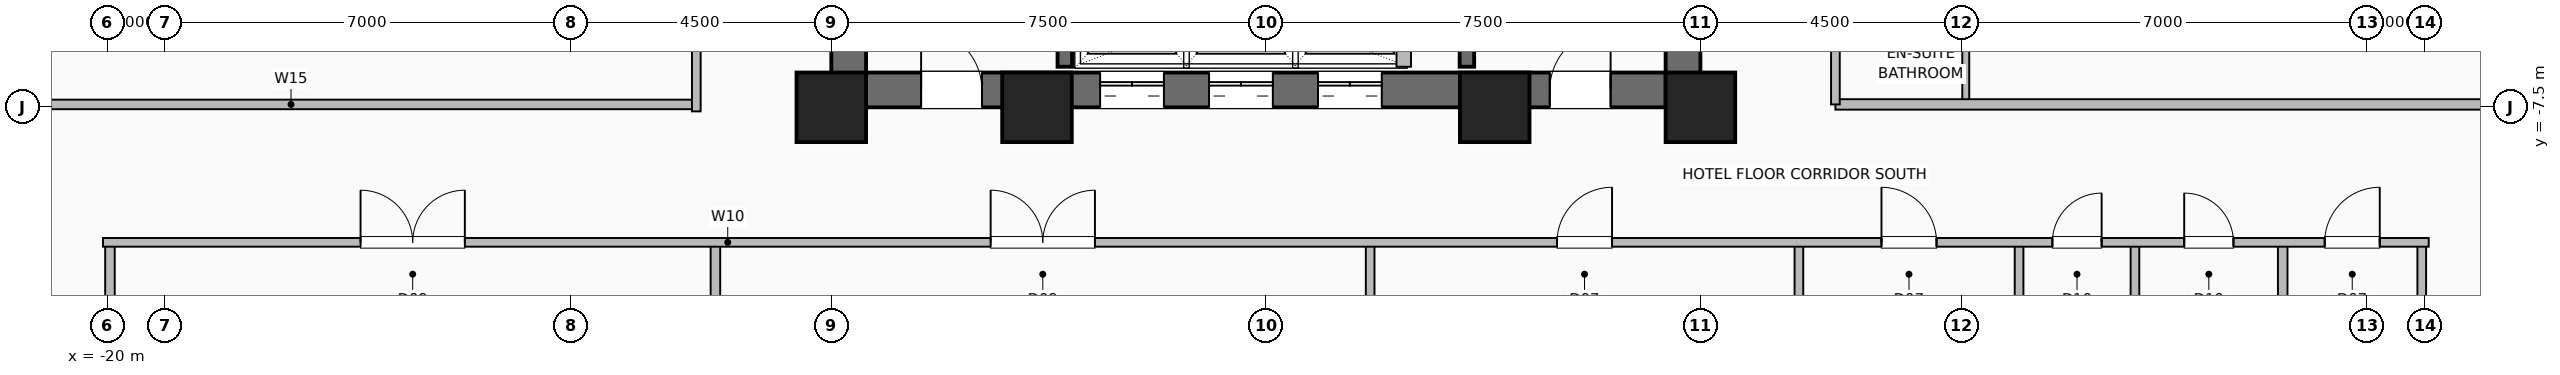
"""IFC4 building model, lengths in metres.
Left out: names, types, materials, properties, quantities, classifications, styles, units other than length and angle.
Written with IfcOpenShell. Run it as: python <this file> out.ifc"""

import sys

from ifc_helpers import new_model, si_unit, direction, frame, frame_2d, origin, origin_2d, place, context, subcontext, project, spatial, rectangle, hollow_rectangle, extrude, element, fill, save


model = new_model("IFC4")
c1 = context("Model", 3, precision=1e-05, world=origin(), true_north=direction((0.0, 1.0)))
c2 = subcontext(c1, "Body", "Model", "MODEL_VIEW")
j1 = project(units=[si_unit("LENGTHUNIT", "METRE"), si_unit("PLANEANGLEUNIT", "RADIAN")], contexts=[c1])
p1 = place(None, origin())
s1 = spatial("IfcSite", under=j1, at=p1, CompositionType="ELEMENT")
p2 = place(p1, origin())
s2 = spatial("IfcBuilding", under=s1, at=p2, CompositionType="ELEMENT")
p3 = place(p2, frame((0.0, 0.0, 72.5)))
s3 = spatial("IfcBuildingStorey", under=s2, at=p3, CompositionType="ELEMENT", Elevation=72.5)
for number, where, z_axis, x_axis in (
    (1, (-7.5, -7.5, 0.0), (0.0, 0.0, 1.0), (1.0, 0.0, 0.0)),
    (2, (-3.95, -7.5, 0.0), (0.0, 0.0, 1.0), (1.0, 0.0, 0.0)),
    (3, (3.95, -7.5, 0.0), (0.0, 0.0, 1.0), (1.0, 0.0, 0.0)),
    (4, (7.5, -7.5, 0.0), (0.0, 0.0, 1.0), (1.0, 0.0, 0.0)),
):
    element("IfcColumn", number, at=place(p3, frame(where, z_axis=z_axis, x_axis=x_axis)), inside=s3, PredefinedType="COLUMN", context=c2, shape_type="SweptSolid", body=[
        extrude(hollow_rectangle(XDim=1.2, YDim=1.2, WallThickness=0.055, at=origin_2d()), origin(), (0.0, 0.0, 1.0), 3.5),
    ])
p4 = place(p3, frame((-7.5, -7.2, 0.0), z_axis=(0.0, 0.0, 1.0), x_axis=(1.0, 0.0, 0.0)))
e5 = element("IfcWall", 5, at=p4, inside=s3, PredefinedType="SHEAR", context=c2, shape_type="SweptSolid", body=[
    extrude(rectangle(XDim=15.0, YDim=0.6, at=frame_2d((7.5, 0.0))), origin(), (0.0, 0.0, 1.0), 3.25),
])
p5 = place(p4, frame((1.55, 0.0, 0.0)))
e6 = element("IfcOpeningElement", 6, at=p5, cuts=e5, PredefinedType="OPENING", context=c2, shape_type="SweptSolid", body=[
    extrude(rectangle(XDim=1.05, YDim=2.08, at=frame_2d((0.525, 1.04))), frame((0.0, 0.31, 0.0), z_axis=(0.0, -1.0, 0.0), x_axis=(1.0, 0.0, 0.0)), (0.0, 0.0, 1.0), 0.62),
])
p6 = place(p4, frame((12.4, 0.0, 0.0)))
e7 = element("IfcOpeningElement", 7, at=p6, cuts=e5, PredefinedType="OPENING", context=c2, shape_type="SweptSolid", body=[
    extrude(rectangle(XDim=1.05, YDim=2.08, at=frame_2d((0.525, 1.04))), frame((0.0, 0.31, 0.0), z_axis=(0.0, -1.0, 0.0), x_axis=(1.0, 0.0, 0.0)), (0.0, 0.0, 1.0), 0.62),
])
p7 = place(p4, frame((4.64, 0.0, 0.0)))
e8 = element("IfcOpeningElement", 8, at=p7, cuts=e5, PredefinedType="OPENING", context=c2, shape_type="SweptSolid", body=[
    extrude(rectangle(XDim=1.1, YDim=2.2, at=frame_2d((0.55, 1.1))), frame((0.0, 0.31, 0.0), z_axis=(0.0, -1.0, 0.0), x_axis=(1.0, 0.0, 0.0)), (0.0, 0.0, 1.0), 0.62),
])
p8 = place(p4, frame((6.52, 0.0, 0.0)))
e9 = element("IfcOpeningElement", 9, at=p8, cuts=e5, PredefinedType="OPENING", context=c2, shape_type="SweptSolid", body=[
    extrude(rectangle(XDim=1.1, YDim=2.2, at=frame_2d((0.55, 1.1))), frame((0.0, 0.31, 0.0), z_axis=(0.0, -1.0, 0.0), x_axis=(1.0, 0.0, 0.0)), (0.0, 0.0, 1.0), 0.62),
])
p9 = place(p4, frame((8.4, 0.0, 0.0)))
e10 = element("IfcOpeningElement", 10, at=p9, cuts=e5, PredefinedType="OPENING", context=c2, shape_type="SweptSolid", body=[
    extrude(rectangle(XDim=1.1, YDim=2.2, at=frame_2d((0.55, 1.1))), frame((0.0, 0.31, 0.0), z_axis=(0.0, -1.0, 0.0), x_axis=(1.0, 0.0, 0.0)), (0.0, 0.0, 1.0), 0.62),
])
p10 = place(p3, frame((-7.2, -7.5, 0.0), z_axis=(0.0, 0.0, 1.0), x_axis=(0.0, 1.0, 0.0)))
e11 = element("IfcWall", 11, at=p10, inside=s3, PredefinedType="SHEAR", context=c2, shape_type="SweptSolid", body=[
    extrude(rectangle(XDim=15.0, YDim=0.6, at=frame_2d((7.5, 0.0))), origin(), (0.0, 0.0, 1.0), 3.25),
])
p11 = place(p10, frame((9.5, 0.0, 0.0)))
e12 = element("IfcOpeningElement", 12, at=p11, cuts=e11, PredefinedType="OPENING", context=c2, shape_type="SweptSolid", body=[
    extrude(rectangle(XDim=1.0, YDim=2.08, at=frame_2d((0.5, 1.04))), frame((0.0, 0.31, 0.0), z_axis=(0.0, -1.0, 0.0), x_axis=(1.0, 0.0, 0.0)), (0.0, 0.0, 1.0), 0.62),
])
p12 = place(p3, frame((7.2, -7.5, 0.0), z_axis=(0.0, 0.0, 1.0), x_axis=(0.0, 1.0, 0.0)))
e13 = element("IfcWall", 13, at=p12, inside=s3, PredefinedType="SHEAR", context=c2, shape_type="SweptSolid", body=[
    extrude(rectangle(XDim=15.0, YDim=0.6, at=frame_2d((7.5, 0.0))), origin(), (0.0, 0.0, 1.0), 3.25),
])
for number, where, z_axis, x_axis in (
    (14, (-3.47, -6.8, 0.0), (0.0, 0.0, 1.0), (0.0, 1.0, 0.0)),
    (15, (3.47, -6.8, 0.0), (0.0, 0.0, 1.0), (0.0, 1.0, 0.0)),
):
    element("IfcWall", number, at=place(p3, frame(where, z_axis=z_axis, x_axis=x_axis)), inside=s3, PredefinedType="SHEAR", context=c2, shape_type="SweptSolid", body=[
        extrude(rectangle(XDim=7.72, YDim=0.25, at=frame_2d((3.86, 0.0))), origin(), (0.0, 0.0, 1.0), 3.25),
    ])
p13 = place(p3, frame((2.38, -6.8, 0.0), z_axis=(0.0, 0.0, 1.0), x_axis=(0.0, 1.0, 0.0)))
e16 = element("IfcWall", 16, at=p13, inside=s3, PredefinedType="SHEAR", context=c2, shape_type="SweptSolid", body=[
    extrude(rectangle(XDim=2.22, YDim=0.25, at=frame_2d((1.11, 0.0))), origin(), (0.0, 0.0, 1.0), 3.25),
])
for number, where, z_axis, x_axis in (
    (17, (17.55, -23.82, 0.0), (0.0, 0.0, 1.0), (0.0, 1.0, 0.0)),
    (18, (-19.95, -23.82, 0.0), (0.0, 0.0, 1.0), (0.0, 1.0, 0.0)),
    (19, (-9.5, -23.82, 0.0), (0.0, 0.0, 1.0), (0.0, 1.0, 0.0)),
):
    element("IfcWall", number, at=place(p3, frame(where, z_axis=z_axis, x_axis=x_axis)), inside=s3, PredefinedType="PLUMBINGWALL", context=c2, shape_type="SweptSolid", body=[
        extrude(rectangle(XDim=13.99, YDim=0.165, at=frame_2d((6.995, 0.0))), origin(), (0.0, 0.0, 1.0), 3.25),
    ])
for number, where, z_axis, x_axis in (
    (20, (1.8, -23.82, 0.0), (0.0, 0.0, 1.0), (0.0, 1.0, 0.0)),
    (21, (9.2, -23.82, 0.0), (0.0, 0.0, 1.0), (0.0, 1.0, 0.0)),
    (22, (13.0, -23.82, 0.0), (0.0, 0.0, 1.0), (0.0, 1.0, 0.0)),
    (23, (15.0, -23.82, 0.0), (0.0, 0.0, 1.0), (0.0, 1.0, 0.0)),
    (24, (19.95, -23.82, 0.0), (0.0, 0.0, 1.0), (0.0, 1.0, 0.0)),
):
    element("IfcWall", number, at=place(p3, frame(where, z_axis=z_axis, x_axis=x_axis)), inside=s3, PredefinedType="PARTITIONING", context=c2, shape_type="SweptSolid", body=[
        extrude(rectangle(XDim=13.99, YDim=0.15, at=frame_2d((6.995, 0.0))), origin(), (0.0, 0.0, 1.0), 3.25),
    ])
p14 = place(p3, frame((-20.07, -9.83, 0.0), z_axis=(0.0, 0.0, 1.0), x_axis=(1.0, 0.0, 0.0)))
e25 = element("IfcWall", 25, at=p14, inside=s3, PredefinedType="PARTITIONING", context=c2, shape_type="SweptSolid", body=[
    extrude(rectangle(XDim=40.14, YDim=0.15, at=frame_2d((20.07, 0.0))), origin(), (0.0, 0.0, 1.0), 3.25),
])
p15 = place(p14, frame((4.445, 0.0, 0.0)))
e26 = element("IfcOpeningElement", 26, at=p15, cuts=e25, PredefinedType="OPENING", context=c2, shape_type="SweptSolid", body=[
    extrude(rectangle(XDim=1.8, YDim=2.08, at=frame_2d((0.9, 1.04))), frame((0.0, 0.085, 0.0), z_axis=(0.0, -1.0, 0.0), x_axis=(1.0, 0.0, 0.0)), (0.0, 0.0, 1.0), 0.17),
])
p16 = place(p14, frame((15.32, 0.0, 0.0)))
e27 = element("IfcOpeningElement", 27, at=p16, cuts=e25, PredefinedType="OPENING", context=c2, shape_type="SweptSolid", body=[
    extrude(rectangle(XDim=1.8, YDim=2.08, at=frame_2d((0.9, 1.04))), frame((0.0, 0.085, 0.0), z_axis=(0.0, -1.0, 0.0), x_axis=(1.0, 0.0, 0.0)), (0.0, 0.0, 1.0), 0.17),
])
p17 = place(p14, frame((25.095, 0.0, 0.0)))
e28 = element("IfcOpeningElement", 28, at=p17, cuts=e25, PredefinedType="OPENING", context=c2, shape_type="SweptSolid", body=[
    extrude(rectangle(XDim=0.95, YDim=2.06, at=frame_2d((0.475, 1.03))), frame((0.0, 0.085, 0.0), z_axis=(0.0, -1.0, 0.0), x_axis=(1.0, 0.0, 0.0)), (0.0, 0.0, 1.0), 0.17),
])
p18 = place(p14, frame((30.695, 0.0, 0.0)))
e29 = element("IfcOpeningElement", 29, at=p18, cuts=e25, PredefinedType="OPENING", context=c2, shape_type="SweptSolid", body=[
    extrude(rectangle(XDim=0.95, YDim=2.06, at=frame_2d((0.475, 1.03))), frame((0.0, 0.085, 0.0), z_axis=(0.0, -1.0, 0.0), x_axis=(1.0, 0.0, 0.0)), (0.0, 0.0, 1.0), 0.17),
])
p19 = place(p14, frame((33.645, 0.0, 0.0)))
e30 = element("IfcOpeningElement", 30, at=p19, cuts=e25, PredefinedType="OPENING", context=c2, shape_type="SweptSolid", body=[
    extrude(rectangle(XDim=0.85, YDim=2.05, at=frame_2d((0.425, 1.025))), frame((0.0, 0.085, 0.0), z_axis=(0.0, -1.0, 0.0), x_axis=(1.0, 0.0, 0.0)), (0.0, 0.0, 1.0), 0.17),
])
p20 = place(p14, frame((35.92, 0.0, 0.0)))
e31 = element("IfcOpeningElement", 31, at=p20, cuts=e25, PredefinedType="OPENING", context=c2, shape_type="SweptSolid", body=[
    extrude(rectangle(XDim=0.85, YDim=2.05, at=frame_2d((0.425, 1.025))), frame((0.0, 0.085, 0.0), z_axis=(0.0, -1.0, 0.0), x_axis=(1.0, 0.0, 0.0)), (0.0, 0.0, 1.0), 0.17),
])
p21 = place(p14, frame((38.345, 0.0, 0.0)))
e32 = element("IfcOpeningElement", 32, at=p21, cuts=e25, PredefinedType="OPENING", context=c2, shape_type="SweptSolid", body=[
    extrude(rectangle(XDim=0.95, YDim=2.06, at=frame_2d((0.475, 1.03))), frame((0.0, 0.085, 0.0), z_axis=(0.0, -1.0, 0.0), x_axis=(1.0, 0.0, 0.0)), (0.0, 0.0, 1.0), 0.17),
])
p22 = place(p3, frame((-23.82, -7.45, 0.0), z_axis=(0.0, 0.0, 1.0), x_axis=(1.0, 0.0, 0.0)))
e33 = element("IfcWall", 33, at=p22, inside=s3, PredefinedType="PLUMBINGWALL", context=c2, shape_type="SweptSolid", body=[
    extrude(rectangle(XDim=13.99, YDim=0.165, at=frame_2d((6.995, 0.0))), origin(), (0.0, 0.0, 1.0), 3.25),
])
p23 = place(p3, frame((-9.83, -7.57, 0.0), z_axis=(0.0, 0.0, 1.0), x_axis=(0.0, 1.0, 0.0)))
e34 = element("IfcWall", 34, at=p23, inside=s3, PredefinedType="PARTITIONING", context=c2, shape_type="SweptSolid", body=[
    extrude(rectangle(XDim=15.14, YDim=0.15, at=frame_2d((7.57, 0.0))), origin(), (0.0, 0.0, 1.0), 3.25),
])
p24 = place(p23, frame((2.47, 0.0, 0.0)))
e35 = element("IfcOpeningElement", 35, at=p24, cuts=e34, PredefinedType="OPENING", context=c2, shape_type="SweptSolid", body=[
    extrude(rectangle(XDim=0.95, YDim=2.06, at=frame_2d((0.475, 1.03))), frame((0.0, 0.085, 0.0), z_axis=(0.0, -1.0, 0.0), x_axis=(1.0, 0.0, 0.0)), (0.0, 0.0, 1.0), 0.17),
])
p25 = place(p23, frame((8.595, 0.0, 0.0)))
e36 = element("IfcOpeningElement", 36, at=p25, cuts=e34, PredefinedType="OPENING", context=c2, shape_type="SweptSolid", body=[
    extrude(rectangle(XDim=0.95, YDim=2.06, at=frame_2d((0.475, 1.03))), frame((0.0, 0.085, 0.0), z_axis=(0.0, -1.0, 0.0), x_axis=(1.0, 0.0, 0.0)), (0.0, 0.0, 1.0), 0.17),
])
p26 = place(p23, frame((13.27, 0.0, 0.0)))
e37 = element("IfcOpeningElement", 37, at=p26, cuts=e34, PredefinedType="OPENING", context=c2, shape_type="SweptSolid", body=[
    extrude(rectangle(XDim=0.85, YDim=2.05, at=frame_2d((0.425, 1.025))), frame((0.0, 0.085, 0.0), z_axis=(0.0, -1.0, 0.0), x_axis=(1.0, 0.0, 0.0)), (0.0, 0.0, 1.0), 0.17),
])
p27 = place(p3, frame((12.08, -7.42, 0.0), z_axis=(0.0, 0.0, 1.0), x_axis=(0.0, 1.0, 0.0)))
e38 = element("IfcWall", 38, at=p27, inside=s3, PredefinedType="PLUMBINGWALL", context=c2, shape_type="SweptSolid", body=[
    extrude(rectangle(XDim=2.008, YDim=0.12, at=frame_2d((1.004, 0.0))), origin(), (0.0, 0.0, 1.0), 3.25),
])
p28 = place(p3, frame((9.83, -7.45, 0.0), z_axis=(0.0, 0.0, 1.0), x_axis=(1.0, 0.0, 0.0)))
e39 = element("IfcWall", 39, at=p28, inside=s3, PredefinedType="PARTITIONING", context=c2, shape_type="SweptSolid", body=[
    extrude(rectangle(XDim=13.99, YDim=0.18, at=frame_2d((6.995, 0.0))), origin(), (0.0, 0.0, 1.0), 3.25),
])
p29 = place(p3, frame((9.83, -7.45, 0.0), z_axis=(0.0, 0.0, 1.0), x_axis=(0.0, 1.0, 0.0)))
e40 = element("IfcWall", 40, at=p29, inside=s3, PredefinedType="PARTITIONING", context=c2, shape_type="SweptSolid", body=[
    extrude(rectangle(XDim=14.9, YDim=0.15, at=frame_2d((7.45, 0.0))), origin(), (0.0, 0.0, 1.0), 3.25),
])
p30 = place(p29, frame((3.049, 0.0, 0.0)))
e41 = element("IfcOpeningElement", 41, at=p30, cuts=e40, PredefinedType="OPENING", context=c2, shape_type="SweptSolid", body=[
    extrude(rectangle(XDim=0.95, YDim=2.08, at=frame_2d((0.475, 1.04))), frame((0.0, 0.085, 0.0), z_axis=(0.0, -1.0, 0.0), x_axis=(1.0, 0.0, 0.0)), (0.0, 0.0, 1.0), 0.17),
])
p31 = place(p29, frame((7.927, 0.0, 0.0)))
e42 = element("IfcOpeningElement", 42, at=p31, cuts=e40, PredefinedType="OPENING", context=c2, shape_type="SweptSolid", body=[
    extrude(rectangle(XDim=0.95, YDim=2.08, at=frame_2d((0.475, 1.04))), frame((0.0, 0.085, 0.0), z_axis=(0.0, -1.0, 0.0), x_axis=(1.0, 0.0, 0.0)), (0.0, 0.0, 1.0), 0.17),
])
p32 = place(p29, frame((12.899, 0.0, 0.0)))
e43 = element("IfcOpeningElement", 43, at=p32, cuts=e40, PredefinedType="OPENING", context=c2, shape_type="SweptSolid", body=[
    extrude(rectangle(XDim=0.95, YDim=2.08, at=frame_2d((0.475, 1.04))), frame((0.0, 0.085, 0.0), z_axis=(0.0, -1.0, 0.0), x_axis=(1.0, 0.0, 0.0)), (0.0, 0.0, 1.0), 0.17),
])
p33 = place(p5, origin())
e44 = element("IfcDoor", 44, at=p33, inside=s3, OperationType="SINGLE_SWING_LEFT", PredefinedType="DOOR", context=c2, shape_type="SweptSolid", body=[
    extrude(rectangle(XDim=1.05, YDim=2.08, at=frame_2d((0.525, 1.04))), frame((0.0, 0.025, 0.0), z_axis=(0.0, -1.0, 0.0), x_axis=(1.0, 0.0, 0.0)), (0.0, 0.0, 1.0), 0.05),
])
fill(e6, e44)
p34 = place(p6, origin())
e45 = element("IfcDoor", 45, at=p34, inside=s3, OperationType="SINGLE_SWING_RIGHT", PredefinedType="DOOR", context=c2, shape_type="SweptSolid", body=[
    extrude(rectangle(XDim=1.05, YDim=2.08, at=frame_2d((0.525, 1.04))), frame((0.0, 0.025, 0.0), z_axis=(0.0, -1.0, 0.0), x_axis=(1.0, 0.0, 0.0)), (0.0, 0.0, 1.0), 0.05),
])
fill(e7, e45)
p35 = place(p7, origin())
e46 = element("IfcDoor", 46, at=p35, inside=s3, OperationType="DOUBLE_DOOR_SLIDING", PredefinedType="DOOR", context=c2, shape_type="SweptSolid", body=[
    extrude(rectangle(XDim=1.1, YDim=2.2, at=frame_2d((0.55, 1.1))), frame((0.0, 0.025, 0.0), z_axis=(0.0, -1.0, 0.0), x_axis=(1.0, 0.0, 0.0)), (0.0, 0.0, 1.0), 0.05),
])
fill(e8, e46)
p36 = place(p8, origin())
e47 = element("IfcDoor", 47, at=p36, inside=s3, OperationType="DOUBLE_DOOR_SLIDING", PredefinedType="DOOR", context=c2, shape_type="SweptSolid", body=[
    extrude(rectangle(XDim=1.1, YDim=2.2, at=frame_2d((0.55, 1.1))), frame((0.0, 0.025, 0.0), z_axis=(0.0, -1.0, 0.0), x_axis=(1.0, 0.0, 0.0)), (0.0, 0.0, 1.0), 0.05),
])
fill(e9, e47)
p37 = place(p9, origin())
e48 = element("IfcDoor", 48, at=p37, inside=s3, OperationType="DOUBLE_DOOR_SLIDING", PredefinedType="DOOR", context=c2, shape_type="SweptSolid", body=[
    extrude(rectangle(XDim=1.1, YDim=2.2, at=frame_2d((0.55, 1.1))), frame((0.0, 0.025, 0.0), z_axis=(0.0, -1.0, 0.0), x_axis=(1.0, 0.0, 0.0)), (0.0, 0.0, 1.0), 0.05),
])
fill(e10, e48)
p38 = place(p15, origin())
e49 = element("IfcDoor", 49, at=p38, inside=s3, OperationType="DOUBLE_DOOR_SINGLE_SWING", PredefinedType="DOOR", context=c2, shape_type="SweptSolid", body=[
    extrude(rectangle(XDim=1.8, YDim=2.08, at=frame_2d((0.9, 1.04))), frame((0.0, 0.025, 0.0), z_axis=(0.0, -1.0, 0.0), x_axis=(1.0, 0.0, 0.0)), (0.0, 0.0, 1.0), 0.05),
])
fill(e26, e49)
p39 = place(p16, origin())
e50 = element("IfcDoor", 50, at=p39, inside=s3, OperationType="DOUBLE_DOOR_SINGLE_SWING", PredefinedType="DOOR", context=c2, shape_type="SweptSolid", body=[
    extrude(rectangle(XDim=1.8, YDim=2.08, at=frame_2d((0.9, 1.04))), frame((0.0, 0.025, 0.0), z_axis=(0.0, -1.0, 0.0), x_axis=(1.0, 0.0, 0.0)), (0.0, 0.0, 1.0), 0.05),
])
fill(e27, e50)
p40 = place(p17, origin())
e51 = element("IfcDoor", 51, at=p40, inside=s3, OperationType="SINGLE_SWING_RIGHT", PredefinedType="DOOR", context=c2, shape_type="SweptSolid", body=[
    extrude(rectangle(XDim=0.95, YDim=2.06, at=frame_2d((0.475, 1.03))), frame((0.0, 0.025, 0.0), z_axis=(0.0, -1.0, 0.0), x_axis=(1.0, 0.0, 0.0)), (0.0, 0.0, 1.0), 0.05),
])
fill(e28, e51)
p41 = place(p18, origin())
e52 = element("IfcDoor", 52, at=p41, inside=s3, OperationType="SINGLE_SWING_LEFT", PredefinedType="DOOR", context=c2, shape_type="SweptSolid", body=[
    extrude(rectangle(XDim=0.95, YDim=2.06, at=frame_2d((0.475, 1.03))), frame((0.0, 0.025, 0.0), z_axis=(0.0, -1.0, 0.0), x_axis=(1.0, 0.0, 0.0)), (0.0, 0.0, 1.0), 0.05),
])
fill(e29, e52)
p42 = place(p19, origin())
e53 = element("IfcDoor", 53, at=p42, inside=s3, OperationType="SINGLE_SWING_RIGHT", PredefinedType="DOOR", context=c2, shape_type="SweptSolid", body=[
    extrude(rectangle(XDim=0.85, YDim=2.05, at=frame_2d((0.425, 1.025))), frame((0.0, 0.025, 0.0), z_axis=(0.0, -1.0, 0.0), x_axis=(1.0, 0.0, 0.0)), (0.0, 0.0, 1.0), 0.05),
])
fill(e30, e53)
p43 = place(p20, origin())
e54 = element("IfcDoor", 54, at=p43, inside=s3, OperationType="SINGLE_SWING_LEFT", PredefinedType="DOOR", context=c2, shape_type="SweptSolid", body=[
    extrude(rectangle(XDim=0.85, YDim=2.05, at=frame_2d((0.425, 1.025))), frame((0.0, 0.025, 0.0), z_axis=(0.0, -1.0, 0.0), x_axis=(1.0, 0.0, 0.0)), (0.0, 0.0, 1.0), 0.05),
])
fill(e31, e54)
p44 = place(p21, origin())
e55 = element("IfcDoor", 55, at=p44, inside=s3, OperationType="SINGLE_SWING_RIGHT", PredefinedType="DOOR", context=c2, shape_type="SweptSolid", body=[
    extrude(rectangle(XDim=0.95, YDim=2.06, at=frame_2d((0.475, 1.03))), frame((0.0, 0.025, 0.0), z_axis=(0.0, -1.0, 0.0), x_axis=(1.0, 0.0, 0.0)), (0.0, 0.0, 1.0), 0.05),
])
fill(e32, e55)
save(model, sys.argv[1])
